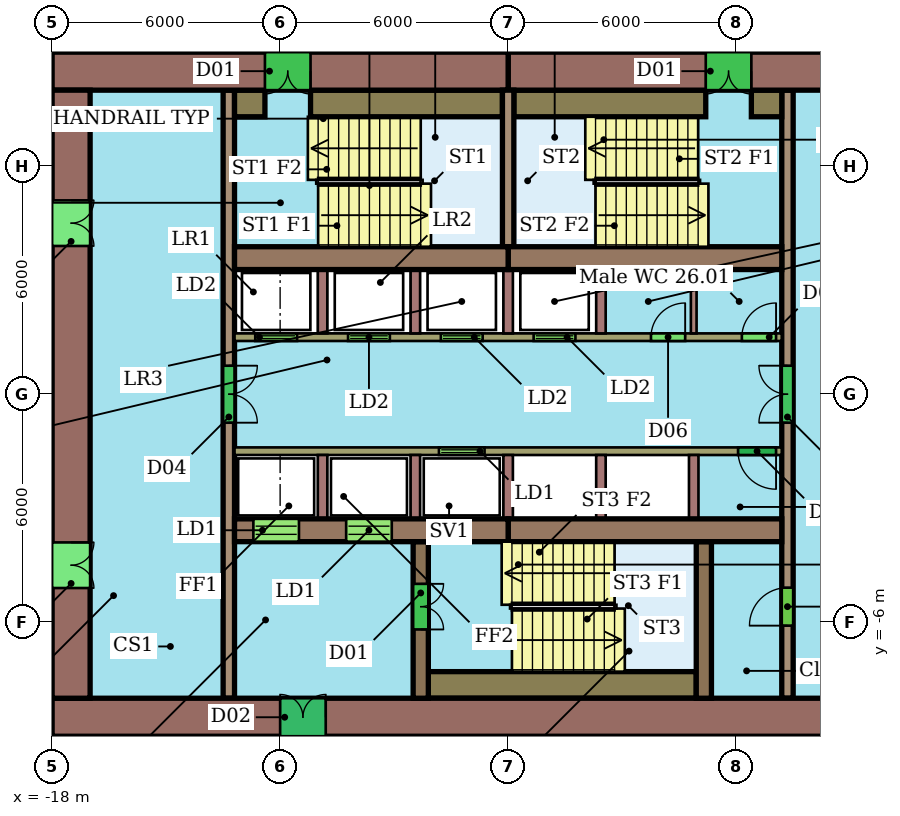
"""IFC4 building model, lengths in metres.
Left out: names, types, materials, properties, quantities, classifications, styles, units other than length and angle.
Written with IfcOpenShell. Run it as: python <this file> out.ifc"""

import sys

from ifc_helpers import new_model, si_unit, direction, frame, frame_2d, origin, place, context, subcontext, project, spatial, rectangle, extrude, element, fill, save


model = new_model("IFC4")
c1 = context("Model", 3, precision=1e-05, world=origin(), true_north=direction((0.0, 1.0)))
c2 = subcontext(c1, "Body", "Model", "MODEL_VIEW")
j1 = project(units=[si_unit("LENGTHUNIT", "METRE"), si_unit("PLANEANGLEUNIT", "RADIAN")], contexts=[c1])
p1 = place(None, origin())
s1 = spatial("IfcSite", under=j1, at=p1, CompositionType="ELEMENT")
p2 = place(p1, origin())
s2 = spatial("IfcBuilding", under=s1, at=p2, CompositionType="ELEMENT")
p3 = place(p2, frame((0.0, 0.0, 113.8)))
s3 = spatial("IfcBuildingStorey", under=s2, at=p3, CompositionType="ELEMENT", Elevation=113.8)
p4 = place(p3, frame((6.0, 8.5, 0.0), z_axis=(0.0, 0.0, 1.0), x_axis=(-1.0, 0.0, 0.0)))
e1 = element("IfcWall", 1, at=p4, inside=s3, PredefinedType="SHEAR", context=c2, shape_type="SweptSolid", body=[
    extrude(rectangle(XDim=12.0, YDim=1.0, at=frame_2d((6.0, 0.0))), origin(), (0.0, 0.0, 1.0), 3.3),
])
p5 = place(p4, frame((5.6, 0.0, 0.0)))
e2 = element("IfcOpeningElement", 2, at=p5, cuts=e1, PredefinedType="OPENING", context=c2, shape_type="SweptSolid", body=[
    extrude(rectangle(XDim=1.2, YDim=2.1, at=frame_2d((0.6, 1.05))), frame((0.0, 0.51, 0.0), z_axis=(0.0, -1.0, 0.0), x_axis=(1.0, 0.0, 0.0)), (0.0, 0.0, 1.0), 1.02),
])
p6 = place(p3, frame((-6.0, 8.5, 0.0), z_axis=(0.0, 0.0, 1.0), x_axis=(-1.0, 0.0, 0.0)))
e3 = element("IfcWall", 3, at=p6, inside=s3, PredefinedType="SHEAR", context=c2, shape_type="SweptSolid", body=[
    extrude(rectangle(XDim=12.0, YDim=1.0, at=frame_2d((6.0, 0.0))), origin(), (0.0, 0.0, 1.0), 3.3),
])
p7 = place(p6, frame((5.2, 0.0, 0.0)))
e4 = element("IfcOpeningElement", 4, at=p7, cuts=e3, PredefinedType="OPENING", context=c2, shape_type="SweptSolid", body=[
    extrude(rectangle(XDim=1.2, YDim=2.1, at=frame_2d((0.6, 1.05))), frame((0.0, 0.51, 0.0), z_axis=(0.0, -1.0, 0.0), x_axis=(1.0, 0.0, 0.0)), (0.0, 0.0, 1.0), 1.02),
])
p8 = place(p3, frame((-18.0, -8.5, 0.0), z_axis=(0.0, 0.0, 1.0), x_axis=(1.0, 0.0, 0.0)))
e5 = element("IfcWall", 5, at=p8, inside=s3, PredefinedType="SHEAR", context=c2, shape_type="SweptSolid", body=[
    extrude(rectangle(XDim=24.0, YDim=1.0, at=frame_2d((12.0, 0.0))), origin(), (0.0, 0.0, 1.0), 3.3),
])
p9 = place(p8, frame((6.0, 0.0, 0.0)))
e6 = element("IfcOpeningElement", 6, at=p9, cuts=e5, PredefinedType="OPENING", context=c2, shape_type="SweptSolid", body=[
    extrude(rectangle(XDim=1.2, YDim=2.1, at=frame_2d((0.6, 1.05))), frame((0.0, 0.51, 0.0), z_axis=(0.0, -1.0, 0.0), x_axis=(1.0, 0.0, 0.0)), (0.0, 0.0, 1.0), 1.02),
])
p10 = place(p3, frame((-17.5, 8.0, 0.0), z_axis=(0.0, 0.0, 1.0), x_axis=(0.0, -1.0, 0.0)))
e7 = element("IfcWall", 7, at=p10, inside=s3, PredefinedType="SHEAR", context=c2, shape_type="SweptSolid", body=[
    extrude(rectangle(XDim=16.0, YDim=1.0, at=frame_2d((8.0, 0.0))), origin(), (0.0, 0.0, 1.0), 3.3),
])
p11 = place(p10, frame((11.9, 0.0, 0.0)))
e8 = element("IfcOpeningElement", 8, at=p11, cuts=e7, PredefinedType="OPENING", context=c2, shape_type="SweptSolid", body=[
    extrude(rectangle(XDim=1.2, YDim=2.1, at=frame_2d((0.6, 1.05))), frame((0.0, 0.51, 0.0), z_axis=(0.0, -1.0, 0.0), x_axis=(1.0, 0.0, 0.0)), (0.0, 0.0, 1.0), 1.02),
])
p12 = place(p10, frame((2.9, 0.0, 0.0)))
e9 = element("IfcOpeningElement", 9, at=p12, cuts=e7, PredefinedType="OPENING", context=c2, shape_type="SweptSolid", body=[
    extrude(rectangle(XDim=1.2, YDim=2.1, at=frame_2d((0.6, 1.05))), frame((0.0, 0.51, 0.0), z_axis=(0.0, -1.0, 0.0), x_axis=(1.0, 0.0, 0.0)), (0.0, 0.0, 1.0), 1.02),
])
for number, where, z_axis, x_axis in (
    (10, (-13.2, 3.58, 0.0), (0.0, 0.0, 1.0), (1.0, 0.0, 0.0)),
    (11, (-6.0, 3.58, 0.0), (0.0, 0.0, 1.0), (1.0, 0.0, 0.0)),
):
    element("IfcWall", number, at=place(p3, frame(where, z_axis=z_axis, x_axis=x_axis)), inside=s3, PredefinedType="SHEAR", context=c2, shape_type="SweptSolid", body=[
        extrude(rectangle(XDim=7.2, YDim=0.6, at=frame_2d((3.6, 0.0))), origin(), (0.0, 0.0, 1.0), 3.3),
    ])
p13 = place(p3, frame((-13.2, -3.58, 0.0), z_axis=(0.0, 0.0, 1.0), x_axis=(1.0, 0.0, 0.0)))
e12 = element("IfcWall", 12, at=p13, inside=s3, PredefinedType="SHEAR", context=c2, shape_type="SweptSolid", body=[
    extrude(rectangle(XDim=7.2, YDim=0.6, at=frame_2d((3.6, 0.0))), origin(), (0.0, 0.0, 1.0), 3.3),
])
p14 = place(p13, frame((0.496, 0.0, 0.0)))
e13 = element("IfcOpeningElement", 13, at=p14, cuts=e12, PredefinedType="OPENING", context=c2, shape_type="SweptSolid", body=[
    extrude(rectangle(XDim=1.2, YDim=2.1, at=frame_2d((0.6, 1.05))), frame((0.0, 0.31, 0.0), z_axis=(0.0, -1.0, 0.0), x_axis=(1.0, 0.0, 0.0)), (0.0, 0.0, 1.0), 0.62),
])
p15 = place(p13, frame((2.938, 0.0, 0.0)))
e14 = element("IfcOpeningElement", 14, at=p15, cuts=e12, PredefinedType="OPENING", context=c2, shape_type="SweptSolid", body=[
    extrude(rectangle(XDim=1.2, YDim=2.1, at=frame_2d((0.6, 1.05))), frame((0.0, 0.31, 0.0), z_axis=(0.0, -1.0, 0.0), x_axis=(1.0, 0.0, 0.0)), (0.0, 0.0, 1.0), 0.62),
])
p16 = place(p3, frame((-6.0, -3.58, 0.0), z_axis=(0.0, 0.0, 1.0), x_axis=(1.0, 0.0, 0.0)))
e15 = element("IfcWall", 15, at=p16, inside=s3, PredefinedType="SHEAR", context=c2, shape_type="SweptSolid", body=[
    extrude(rectangle(XDim=7.2, YDim=0.6, at=frame_2d((3.6, 0.0))), origin(), (0.0, 0.0, 1.0), 3.3),
])
p17 = place(p3, frame((-13.35, 8.0, 0.0), z_axis=(0.0, 0.0, 1.0), x_axis=(0.0, -1.0, 0.0)))
e16 = element("IfcWall", 16, at=p17, inside=s3, PredefinedType="SHEAR", context=c2, shape_type="SweptSolid", body=[
    extrude(rectangle(XDim=16.0, YDim=0.3, at=frame_2d((8.0, 0.0))), origin(), (0.0, 0.0, 1.0), 3.3),
])
p18 = place(p17, frame((7.25, 0.0, 0.0)))
e17 = element("IfcOpeningElement", 17, at=p18, cuts=e16, PredefinedType="OPENING", context=c2, shape_type="SweptSolid", body=[
    extrude(rectangle(XDim=1.5, YDim=2.1, at=frame_2d((0.75, 1.05))), frame((0.0, 0.16, 0.0), z_axis=(0.0, -1.0, 0.0), x_axis=(1.0, 0.0, 0.0)), (0.0, 0.0, 1.0), 0.32),
])
p19 = place(p3, frame((1.35, -8.0, 0.0), z_axis=(0.0, 0.0, 1.0), x_axis=(0.0, 1.0, 0.0)))
e18 = element("IfcWall", 18, at=p19, inside=s3, PredefinedType="SHEAR", context=c2, shape_type="SweptSolid", body=[
    extrude(rectangle(XDim=16.0, YDim=0.3, at=frame_2d((8.0, 0.0))), origin(), (0.0, 0.0, 1.0), 3.3),
])
p20 = place(p19, frame((1.91, 0.0, 0.0)))
e19 = element("IfcOpeningElement", 19, at=p20, cuts=e18, PredefinedType="OPENING", context=c2, shape_type="SweptSolid", body=[
    extrude(rectangle(XDim=1.0, YDim=2.1, at=frame_2d((0.5, 1.05))), frame((0.0, 0.16, 0.0), z_axis=(0.0, -1.0, 0.0), x_axis=(1.0, 0.0, 0.0)), (0.0, 0.0, 1.0), 0.32),
])
p21 = place(p19, frame((7.25, 0.0, 0.0)))
e20 = element("IfcOpeningElement", 20, at=p21, cuts=e18, PredefinedType="OPENING", context=c2, shape_type="SweptSolid", body=[
    extrude(rectangle(XDim=1.5, YDim=2.1, at=frame_2d((0.75, 1.05))), frame((0.0, 0.16, 0.0), z_axis=(0.0, -1.0, 0.0), x_axis=(1.0, 0.0, 0.0)), (0.0, 0.0, 1.0), 0.32),
])
p22 = place(p3, frame((-13.2, 1.5, 0.0), z_axis=(0.0, 0.0, 1.0), x_axis=(1.0, 0.0, 0.0)))
e21 = element("IfcWall", 21, at=p22, inside=s3, PredefinedType="SHEAR", context=c2, shape_type="SweptSolid", body=[
    extrude(rectangle(XDim=14.4, YDim=0.2, at=frame_2d((7.2, 0.0))), origin(), (0.0, 0.0, 1.0), 3.3),
])
p23 = place(p22, frame((0.546, 0.0, 0.0)))
e22 = element("IfcOpeningElement", 22, at=p23, cuts=e21, PredefinedType="OPENING", context=c2, shape_type="SweptSolid", body=[
    extrude(rectangle(XDim=1.1, YDim=2.1, at=frame_2d((0.55, 1.05))), frame((0.0, 0.11, 0.0), z_axis=(0.0, -1.0, 0.0), x_axis=(1.0, 0.0, 0.0)), (0.0, 0.0, 1.0), 0.22),
])
p24 = place(p22, frame((2.988, 0.0, 0.0)))
e23 = element("IfcOpeningElement", 23, at=p24, cuts=e21, PredefinedType="OPENING", context=c2, shape_type="SweptSolid", body=[
    extrude(rectangle(XDim=1.1, YDim=2.1, at=frame_2d((0.55, 1.05))), frame((0.0, 0.11, 0.0), z_axis=(0.0, -1.0, 0.0), x_axis=(1.0, 0.0, 0.0)), (0.0, 0.0, 1.0), 0.22),
])
p25 = place(p22, frame((5.429, 0.0, 0.0)))
e24 = element("IfcOpeningElement", 24, at=p25, cuts=e21, PredefinedType="OPENING", context=c2, shape_type="SweptSolid", body=[
    extrude(rectangle(XDim=1.1, YDim=2.1, at=frame_2d((0.55, 1.05))), frame((0.0, 0.11, 0.0), z_axis=(0.0, -1.0, 0.0), x_axis=(1.0, 0.0, 0.0)), (0.0, 0.0, 1.0), 0.22),
])
p26 = place(p22, frame((7.871, 0.0, 0.0)))
e25 = element("IfcOpeningElement", 25, at=p26, cuts=e21, PredefinedType="OPENING", context=c2, shape_type="SweptSolid", body=[
    extrude(rectangle(XDim=1.1, YDim=2.1, at=frame_2d((0.55, 1.05))), frame((0.0, 0.11, 0.0), z_axis=(0.0, -1.0, 0.0), x_axis=(1.0, 0.0, 0.0)), (0.0, 0.0, 1.0), 0.22),
])
p27 = place(p22, frame((10.958, 0.0, 0.0)))
e26 = element("IfcOpeningElement", 26, at=p27, cuts=e21, PredefinedType="OPENING", context=c2, shape_type="SweptSolid", body=[
    extrude(rectangle(XDim=0.9, YDim=2.1, at=frame_2d((0.45, 1.05))), frame((0.0, 0.11, 0.0), z_axis=(0.0, -1.0, 0.0), x_axis=(1.0, 0.0, 0.0)), (0.0, 0.0, 1.0), 0.22),
])
p28 = place(p22, frame((13.35, 0.0, 0.0)))
e27 = element("IfcOpeningElement", 27, at=p28, cuts=e21, PredefinedType="OPENING", context=c2, shape_type="SweptSolid", body=[
    extrude(rectangle(XDim=0.9, YDim=2.1, at=frame_2d((0.45, 1.05))), frame((0.0, 0.11, 0.0), z_axis=(0.0, -1.0, 0.0), x_axis=(1.0, 0.0, 0.0)), (0.0, 0.0, 1.0), 0.22),
])
p29 = place(p3, frame((1.2, -1.5, 0.0), z_axis=(0.0, 0.0, 1.0), x_axis=(-1.0, 0.0, 0.0)))
e28 = element("IfcWall", 28, at=p29, inside=s3, PredefinedType="SHEAR", context=c2, shape_type="SweptSolid", body=[
    extrude(rectangle(XDim=14.4, YDim=0.2, at=frame_2d((7.2, 0.0))), origin(), (0.0, 0.0, 1.0), 3.3),
])
p30 = place(p29, frame((7.821, 0.0, 0.0)))
e29 = element("IfcOpeningElement", 29, at=p30, cuts=e28, PredefinedType="OPENING", context=c2, shape_type="SweptSolid", body=[
    extrude(rectangle(XDim=1.2, YDim=2.1, at=frame_2d((0.6, 1.05))), frame((0.0, 0.11, 0.0), z_axis=(0.0, -1.0, 0.0), x_axis=(1.0, 0.0, 0.0)), (0.0, 0.0, 1.0), 0.22),
])
p31 = place(p29, frame((0.15, 0.0, 0.0)))
e30 = element("IfcOpeningElement", 30, at=p31, cuts=e28, PredefinedType="OPENING", context=c2, shape_type="SweptSolid", body=[
    extrude(rectangle(XDim=1.0, YDim=2.1, at=frame_2d((0.5, 1.05))), frame((0.0, 0.11, 0.0), z_axis=(0.0, -1.0, 0.0), x_axis=(1.0, 0.0, 0.0)), (0.0, 0.0, 1.0), 0.22),
])
p32 = place(p3, frame((-8.3, -3.88, 0.0), z_axis=(0.0, 0.0, 1.0), x_axis=(0.0, -1.0, 0.0)))
e31 = element("IfcWall", 31, at=p32, inside=s3, PredefinedType="SHEAR", context=c2, shape_type="SweptSolid", body=[
    extrude(rectangle(XDim=4.12, YDim=0.4, at=frame_2d((2.06, 0.0))), origin(), (0.0, 0.0, 1.0), 3.3),
])
p33 = place(p32, frame((1.11, 0.0, 0.0)))
e32 = element("IfcOpeningElement", 32, at=p33, cuts=e31, PredefinedType="OPENING", context=c2, shape_type="SweptSolid", body=[
    extrude(rectangle(XDim=1.2, YDim=2.1, at=frame_2d((0.6, 1.05))), frame((0.0, 0.21, 0.0), z_axis=(0.0, -1.0, 0.0), x_axis=(1.0, 0.0, 0.0)), (0.0, 0.0, 1.0), 0.42),
])
p34 = place(p3, frame((-0.85, -3.88, 0.0), z_axis=(0.0, 0.0, 1.0), x_axis=(0.0, -1.0, 0.0)))
e33 = element("IfcWall", 33, at=p34, inside=s3, PredefinedType="SHEAR", context=c2, shape_type="SweptSolid", body=[
    extrude(rectangle(XDim=4.12, YDim=0.4, at=frame_2d((2.06, 0.0))), origin(), (0.0, 0.0, 1.0), 3.3),
])
p35 = place(p3, frame((-6.0, 3.88, 0.0), z_axis=(0.0, 0.0, 1.0), x_axis=(0.0, 1.0, 0.0)))
e34 = element("IfcWall", 34, at=p35, inside=s3, PredefinedType="SHEAR", context=c2, shape_type="SweptSolid", body=[
    extrude(rectangle(XDim=4.12, YDim=0.3, at=frame_2d((2.06, 0.0))), origin(), (0.0, 0.0, 1.0), 3.3),
])
p36 = place(p3, frame((-13.2, 7.65, 0.0), z_axis=(0.0, 0.0, 1.0), x_axis=(1.0, 0.0, 0.0)))
e35 = element("IfcWall", 35, at=p36, inside=s3, PredefinedType="SHEAR", context=c2, shape_type="SweptSolid", body=[
    extrude(rectangle(XDim=0.8, YDim=0.7, at=frame_2d((0.4, 0.0))), origin(), (0.0, 0.0, 1.0), 3.3),
])
for number, where, z_axis, x_axis in (
    (36, (-11.2, 7.65, 0.0), (0.0, 0.0, 1.0), (1.0, 0.0, 0.0)),
    (37, (-5.85, 7.65, 0.0), (0.0, 0.0, 1.0), (1.0, 0.0, 0.0)),
):
    element("IfcWall", number, at=place(p3, frame(where, z_axis=z_axis, x_axis=x_axis)), inside=s3, PredefinedType="SHEAR", context=c2, shape_type="SweptSolid", body=[
        extrude(rectangle(XDim=5.05, YDim=0.7, at=frame_2d((2.525, 0.0))), origin(), (0.0, 0.0, 1.0), 3.3),
    ])
p37 = place(p3, frame((0.4, 7.65, 0.0), z_axis=(0.0, 0.0, 1.0), x_axis=(1.0, 0.0, 0.0)))
e38 = element("IfcWall", 38, at=p37, inside=s3, PredefinedType="SHEAR", context=c2, shape_type="SweptSolid", body=[
    extrude(rectangle(XDim=0.8, YDim=0.7, at=frame_2d((0.4, 0.0))), origin(), (0.0, 0.0, 1.0), 3.3),
])
p38 = place(p3, frame((-8.1, -7.65, 0.0), z_axis=(0.0, 0.0, 1.0), x_axis=(1.0, 0.0, 0.0)))
e39 = element("IfcWall", 39, at=p38, inside=s3, PredefinedType="SHEAR", context=c2, shape_type="SweptSolid", body=[
    extrude(rectangle(XDim=7.05, YDim=0.7, at=frame_2d((3.525, 0.0))), origin(), (0.0, 0.0, 1.0), 3.3),
])
for number, where, z_axis, x_axis in (
    (40, (-10.883, 1.6, 0.0), (0.0, 0.0, 1.0), (0.0, 1.0, 0.0)),
    (41, (-8.442, 1.6, 0.0), (0.0, 0.0, 1.0), (0.0, 1.0, 0.0)),
    (42, (-6.0, 1.6, 0.0), (0.0, 0.0, 1.0), (0.0, 1.0, 0.0)),
    (43, (-3.558, 1.6, 0.0), (0.0, 0.0, 1.0), (0.0, 1.0, 0.0)),
):
    element("IfcWall", number, at=place(p3, frame(where, z_axis=z_axis, x_axis=x_axis)), inside=s3, PredefinedType="SHEAR", context=c2, shape_type="SweptSolid", body=[
        extrude(rectangle(XDim=1.68, YDim=0.25, at=frame_2d((0.84, 0.0))), origin(), (0.0, 0.0, 1.0), 3.3),
    ])
p39 = place(p3, frame((-1.117, 1.6, 0.0), z_axis=(0.0, 0.0, 1.0), x_axis=(0.0, 1.0, 0.0)))
e44 = element("IfcWall", 44, at=p39, inside=s3, PredefinedType="PARTITIONING", context=c2, shape_type="SweptSolid", body=[
    extrude(rectangle(XDim=1.68, YDim=0.15, at=frame_2d((0.84, 0.0))), origin(), (0.0, 0.0, 1.0), 3.3),
])
for number, where, z_axis, x_axis in (
    (45, (-10.883, -1.6, 0.0), (0.0, 0.0, 1.0), (0.0, -1.0, 0.0)),
    (46, (-8.442, -1.6, 0.0), (0.0, 0.0, 1.0), (0.0, -1.0, 0.0)),
    (47, (-6.0, -1.6, 0.0), (0.0, 0.0, 1.0), (0.0, -1.0, 0.0)),
    (48, (-3.558, -1.6, 0.0), (0.0, 0.0, 1.0), (0.0, -1.0, 0.0)),
    (49, (-1.117, -1.6, 0.0), (0.0, 0.0, 1.0), (0.0, -1.0, 0.0)),
):
    element("IfcWall", number, at=place(p3, frame(where, z_axis=z_axis, x_axis=x_axis)), inside=s3, PredefinedType="SHEAR", context=c2, shape_type="SweptSolid", body=[
        extrude(rectangle(XDim=1.68, YDim=0.25, at=frame_2d((0.84, 0.0))), origin(), (0.0, 0.0, 1.0), 3.3),
    ])
p40 = place(p5, origin())
e50 = element("IfcDoor", 50, at=p40, inside=s3, OperationType="DOUBLE_DOOR_SINGLE_SWING", PredefinedType="NOTDEFINED", context=c2, shape_type="SweptSolid", body=[
    extrude(rectangle(XDim=1.2, YDim=2.1, at=frame_2d((0.6, 1.05))), frame((0.0, 0.025, 0.0), z_axis=(0.0, -1.0, 0.0), x_axis=(1.0, 0.0, 0.0)), (0.0, 0.0, 1.0), 0.05),
])
fill(e2, e50)
p41 = place(p7, origin())
e51 = element("IfcDoor", 51, at=p41, inside=s3, OperationType="DOUBLE_DOOR_SINGLE_SWING", PredefinedType="NOTDEFINED", context=c2, shape_type="SweptSolid", body=[
    extrude(rectangle(XDim=1.2, YDim=2.1, at=frame_2d((0.6, 1.05))), frame((0.0, 0.025, 0.0), z_axis=(0.0, -1.0, 0.0), x_axis=(1.0, 0.0, 0.0)), (0.0, 0.0, 1.0), 0.05),
])
fill(e4, e51)
p42 = place(p9, origin())
e52 = element("IfcDoor", 52, at=p42, inside=s3, OperationType="DOUBLE_DOOR_SINGLE_SWING", PredefinedType="NOTDEFINED", context=c2, shape_type="SweptSolid", body=[
    extrude(rectangle(XDim=1.2, YDim=2.1, at=frame_2d((0.6, 1.05))), frame((0.0, 0.025, 0.0), z_axis=(0.0, -1.0, 0.0), x_axis=(1.0, 0.0, 0.0)), (0.0, 0.0, 1.0), 0.05),
])
fill(e6, e52)
p43 = place(p11, origin())
e53 = element("IfcDoor", 53, at=p43, inside=s3, OperationType="DOUBLE_DOOR_SINGLE_SWING", PredefinedType="NOTDEFINED", context=c2, shape_type="SweptSolid", body=[
    extrude(rectangle(XDim=1.2, YDim=2.1, at=frame_2d((0.6, 1.05))), frame((0.0, 0.025, 0.0), z_axis=(0.0, -1.0, 0.0), x_axis=(1.0, 0.0, 0.0)), (0.0, 0.0, 1.0), 0.05),
])
fill(e8, e53)
p44 = place(p12, origin())
e54 = element("IfcDoor", 54, at=p44, inside=s3, OperationType="DOUBLE_DOOR_SINGLE_SWING", PredefinedType="NOTDEFINED", context=c2, shape_type="SweptSolid", body=[
    extrude(rectangle(XDim=1.2, YDim=2.1, at=frame_2d((0.6, 1.05))), frame((0.0, 0.025, 0.0), z_axis=(0.0, -1.0, 0.0), x_axis=(1.0, 0.0, 0.0)), (0.0, 0.0, 1.0), 0.05),
])
fill(e9, e54)
p45 = place(p14, origin())
e55 = element("IfcDoor", 55, at=p45, inside=s3, OperationType="DOUBLE_DOOR_SLIDING", PredefinedType="NOTDEFINED", context=c2, shape_type="SweptSolid", body=[
    extrude(rectangle(XDim=1.2, YDim=2.1, at=frame_2d((0.6, 1.05))), frame((0.0, 0.025, 0.0), z_axis=(0.0, -1.0, 0.0), x_axis=(1.0, 0.0, 0.0)), (0.0, 0.0, 1.0), 0.05),
])
fill(e13, e55)
p46 = place(p15, origin())
e56 = element("IfcDoor", 56, at=p46, inside=s3, OperationType="DOUBLE_DOOR_SLIDING", PredefinedType="NOTDEFINED", context=c2, shape_type="SweptSolid", body=[
    extrude(rectangle(XDim=1.2, YDim=2.1, at=frame_2d((0.6, 1.05))), frame((0.0, 0.025, 0.0), z_axis=(0.0, -1.0, 0.0), x_axis=(1.0, 0.0, 0.0)), (0.0, 0.0, 1.0), 0.05),
])
fill(e14, e56)
p47 = place(p18, origin())
e57 = element("IfcDoor", 57, at=p47, inside=s3, OperationType="DOUBLE_DOOR_SINGLE_SWING", PredefinedType="NOTDEFINED", context=c2, shape_type="SweptSolid", body=[
    extrude(rectangle(XDim=1.5, YDim=2.1, at=frame_2d((0.75, 1.05))), frame((0.0, 0.025, 0.0), z_axis=(0.0, -1.0, 0.0), x_axis=(1.0, 0.0, 0.0)), (0.0, 0.0, 1.0), 0.05),
])
fill(e17, e57)
p48 = place(p20, origin())
e58 = element("IfcDoor", 58, at=p48, inside=s3, OperationType="SINGLE_SWING_LEFT", PredefinedType="NOTDEFINED", context=c2, shape_type="SweptSolid", body=[
    extrude(rectangle(XDim=1.0, YDim=2.1, at=frame_2d((0.5, 1.05))), frame((0.0, 0.025, 0.0), z_axis=(0.0, -1.0, 0.0), x_axis=(1.0, 0.0, 0.0)), (0.0, 0.0, 1.0), 0.05),
])
fill(e19, e58)
p49 = place(p21, origin())
e59 = element("IfcDoor", 59, at=p49, inside=s3, OperationType="DOUBLE_DOOR_SINGLE_SWING", PredefinedType="NOTDEFINED", context=c2, shape_type="SweptSolid", body=[
    extrude(rectangle(XDim=1.5, YDim=2.1, at=frame_2d((0.75, 1.05))), frame((0.0, 0.025, 0.0), z_axis=(0.0, -1.0, 0.0), x_axis=(1.0, 0.0, 0.0)), (0.0, 0.0, 1.0), 0.05),
])
fill(e20, e59)
p50 = place(p23, origin())
e60 = element("IfcDoor", 60, at=p50, inside=s3, OperationType="DOUBLE_DOOR_SLIDING", PredefinedType="NOTDEFINED", context=c2, shape_type="SweptSolid", body=[
    extrude(rectangle(XDim=1.1, YDim=2.1, at=frame_2d((0.55, 1.05))), frame((0.0, 0.025, 0.0), z_axis=(0.0, -1.0, 0.0), x_axis=(1.0, 0.0, 0.0)), (0.0, 0.0, 1.0), 0.05),
])
fill(e22, e60)
p51 = place(p24, origin())
e61 = element("IfcDoor", 61, at=p51, inside=s3, OperationType="DOUBLE_DOOR_SLIDING", PredefinedType="NOTDEFINED", context=c2, shape_type="SweptSolid", body=[
    extrude(rectangle(XDim=1.1, YDim=2.1, at=frame_2d((0.55, 1.05))), frame((0.0, 0.025, 0.0), z_axis=(0.0, -1.0, 0.0), x_axis=(1.0, 0.0, 0.0)), (0.0, 0.0, 1.0), 0.05),
])
fill(e23, e61)
p52 = place(p25, origin())
e62 = element("IfcDoor", 62, at=p52, inside=s3, OperationType="DOUBLE_DOOR_SLIDING", PredefinedType="NOTDEFINED", context=c2, shape_type="SweptSolid", body=[
    extrude(rectangle(XDim=1.1, YDim=2.1, at=frame_2d((0.55, 1.05))), frame((0.0, 0.025, 0.0), z_axis=(0.0, -1.0, 0.0), x_axis=(1.0, 0.0, 0.0)), (0.0, 0.0, 1.0), 0.05),
])
fill(e24, e62)
p53 = place(p26, origin())
e63 = element("IfcDoor", 63, at=p53, inside=s3, OperationType="DOUBLE_DOOR_SLIDING", PredefinedType="NOTDEFINED", context=c2, shape_type="SweptSolid", body=[
    extrude(rectangle(XDim=1.1, YDim=2.1, at=frame_2d((0.55, 1.05))), frame((0.0, 0.025, 0.0), z_axis=(0.0, -1.0, 0.0), x_axis=(1.0, 0.0, 0.0)), (0.0, 0.0, 1.0), 0.05),
])
fill(e25, e63)
p54 = place(p27, origin())
e64 = element("IfcDoor", 64, at=p54, inside=s3, OperationType="SINGLE_SWING_RIGHT", PredefinedType="NOTDEFINED", context=c2, shape_type="SweptSolid", body=[
    extrude(rectangle(XDim=0.9, YDim=2.1, at=frame_2d((0.45, 1.05))), frame((0.0, 0.025, 0.0), z_axis=(0.0, -1.0, 0.0), x_axis=(1.0, 0.0, 0.0)), (0.0, 0.0, 1.0), 0.05),
])
fill(e26, e64)
p55 = place(p28, origin())
e65 = element("IfcDoor", 65, at=p55, inside=s3, OperationType="SINGLE_SWING_RIGHT", PredefinedType="NOTDEFINED", context=c2, shape_type="SweptSolid", body=[
    extrude(rectangle(XDim=0.9, YDim=2.1, at=frame_2d((0.45, 1.05))), frame((0.0, 0.025, 0.0), z_axis=(0.0, -1.0, 0.0), x_axis=(1.0, 0.0, 0.0)), (0.0, 0.0, 1.0), 0.05),
])
fill(e27, e65)
p56 = place(p30, origin())
e66 = element("IfcDoor", 66, at=p56, inside=s3, OperationType="DOUBLE_DOOR_SLIDING", PredefinedType="NOTDEFINED", context=c2, shape_type="SweptSolid", body=[
    extrude(rectangle(XDim=1.2, YDim=2.1, at=frame_2d((0.6, 1.05))), frame((0.0, 0.025, 0.0), z_axis=(0.0, -1.0, 0.0), x_axis=(1.0, 0.0, 0.0)), (0.0, 0.0, 1.0), 0.05),
])
fill(e29, e66)
p57 = place(p31, origin())
e67 = element("IfcDoor", 67, at=p57, inside=s3, OperationType="SINGLE_SWING_LEFT", PredefinedType="NOTDEFINED", context=c2, shape_type="SweptSolid", body=[
    extrude(rectangle(XDim=1.0, YDim=2.1, at=frame_2d((0.5, 1.05))), frame((0.0, 0.025, 0.0), z_axis=(0.0, -1.0, 0.0), x_axis=(1.0, 0.0, 0.0)), (0.0, 0.0, 1.0), 0.05),
])
fill(e30, e67)
p58 = place(p33, origin())
e68 = element("IfcDoor", 68, at=p58, inside=s3, OperationType="DOUBLE_DOOR_SINGLE_SWING", PredefinedType="NOTDEFINED", context=c2, shape_type="SweptSolid", body=[
    extrude(rectangle(XDim=1.2, YDim=2.1, at=frame_2d((0.6, 1.05))), frame((0.0, 0.025, 0.0), z_axis=(0.0, -1.0, 0.0), x_axis=(1.0, 0.0, 0.0)), (0.0, 0.0, 1.0), 0.05),
])
fill(e32, e68)
save(model, sys.argv[1])
